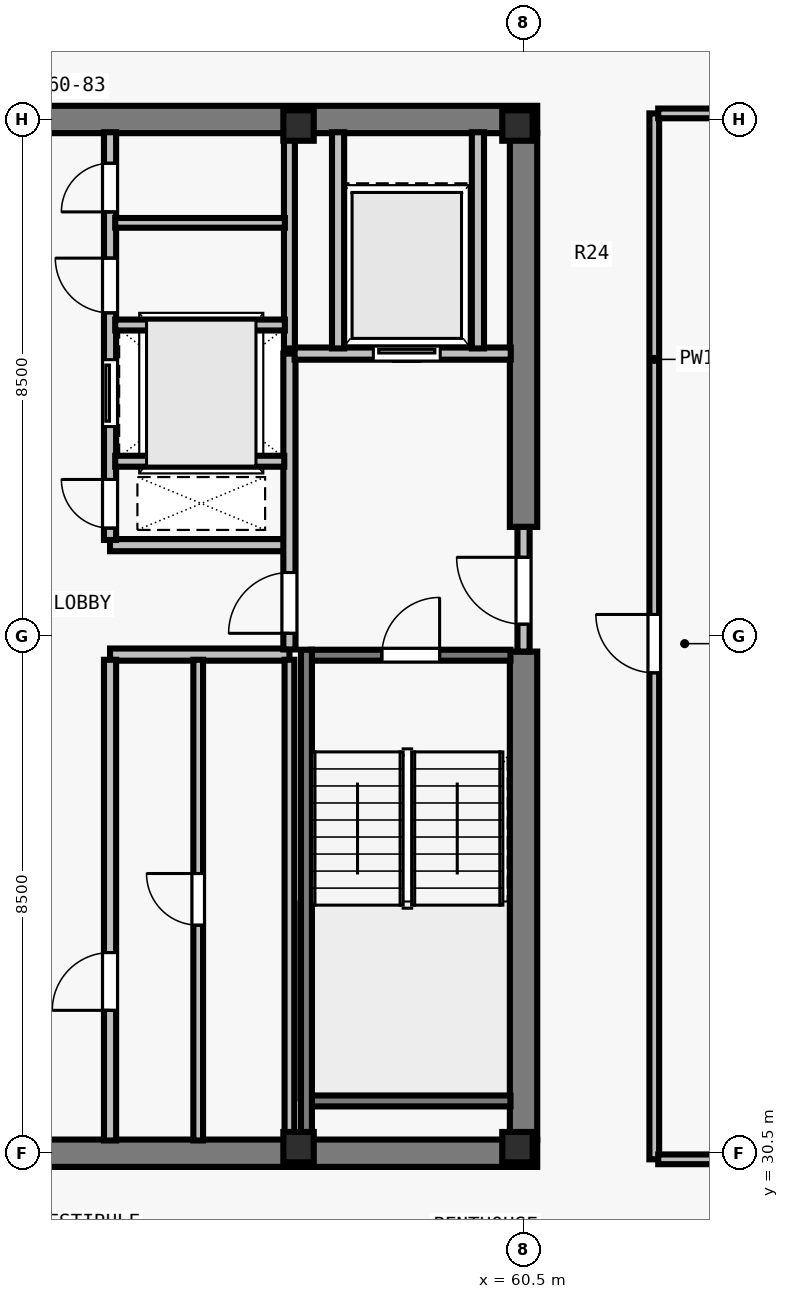
"""IFC4 building model, lengths in metres.
Left out: names, types, materials, properties, quantities, classifications, styles, units other than length and angle.
Written with IfcOpenShell. Run it as: python <this file> out.ifc"""

import sys

from ifc_helpers import new_model, si_unit, direction, frame, frame_2d, origin, origin_2d, place, context, subcontext, project, spatial, rectangle, i_section, extrude, element, fill, save


model = new_model("IFC4")
c1 = context("Model", 3, precision=1e-05, world=origin(), true_north=direction((0.0, 1.0)))
c2 = subcontext(c1, "Body", "Model", "MODEL_VIEW")
j1 = project(units=[si_unit("LENGTHUNIT", "METRE"), si_unit("PLANEANGLEUNIT", "RADIAN")], contexts=[c1])
p1 = place(None, origin())
s1 = spatial("IfcSite", under=j1, at=p1, CompositionType="ELEMENT")
p2 = place(p1, origin())
s2 = spatial("IfcBuilding", under=s1, at=p2, CompositionType="ELEMENT")
p3 = place(p2, frame((0.0, 0.0, 291.0)))
s3 = spatial("IfcBuildingStorey", under=s2, at=p3, CompositionType="ELEMENT", Elevation=291.0)
for number, where, z_axis, x_axis in (
    (1, (56.8, 30.6, 0.0), (0.0, 0.0, 1.0), (1.0, 0.0, 0.0)),
    (2, (60.4, 30.6, 0.0), (0.0, 0.0, 1.0), (1.0, 0.0, 0.0)),
    (3, (56.8, 47.4, 0.0), (0.0, 0.0, 1.0), (1.0, 0.0, 0.0)),
    (4, (60.4, 47.4, 0.0), (0.0, 0.0, 1.0), (1.0, 0.0, 0.0)),
):
    element("IfcColumn", number, at=place(p3, frame(where, z_axis=z_axis, x_axis=x_axis)), inside=s3, PredefinedType="COLUMN", context=c2, shape_type="SweptSolid", body=[
        extrude(i_section(OverallWidth=0.5, OverallDepth=0.5, WebThickness=0.028, FlangeThickness=0.045, at=origin_2d()), origin(), (0.0, 0.0, 1.0), 3.5),
    ])
for number, where, z_axis, x_axis in (
    (5, (43.275, 30.5, 0.0), (0.0, 0.0, 1.0), (1.0, 0.0, 0.0)),
    (6, (43.275, 47.5, 0.0), (0.0, 0.0, 1.0), (1.0, 0.0, 0.0)),
):
    element("IfcWall", number, at=place(p3, frame(where, z_axis=z_axis, x_axis=x_axis)), inside=s3, PredefinedType="SHEAR", context=c2, shape_type="SweptSolid", body=[
        extrude(rectangle(XDim=17.45, YDim=0.45, at=frame_2d((8.725, 0.0))), origin(), (0.0, 0.0, 1.0), 3.29),
    ])
p4 = place(p3, frame((60.5, 30.715, 0.0), z_axis=(0.0, 0.0, 1.0), x_axis=(0.0, 1.0, 0.0)))
e7 = element("IfcWall", 7, at=p4, inside=s3, PredefinedType="SHEAR", context=c2, shape_type="SweptSolid", body=[
    extrude(rectangle(XDim=8.035, YDim=0.45, at=frame_2d((4.018, 0.0))), origin(), (0.0, 0.0, 1.0), 3.29),
])
p5 = place(p3, frame((60.5, 40.8, 0.0), z_axis=(0.0, 0.0, 1.0), x_axis=(0.0, 1.0, 0.0)))
e8 = element("IfcWall", 8, at=p5, inside=s3, PredefinedType="SHEAR", context=c2, shape_type="SweptSolid", body=[
    extrude(rectangle(XDim=6.485, YDim=0.45, at=frame_2d((3.242, 0.0))), origin(), (0.0, 0.0, 1.0), 3.29),
])
for number, where, z_axis, x_axis in (
    (9, (53.7, 38.7, 0.0), (0.0, 0.0, 1.0), (1.0, 0.0, 0.0)),
    (10, (53.7, 40.5, 0.0), (0.0, 0.0, 1.0), (1.0, 0.0, 0.0)),
):
    element("IfcWall", number, at=place(p3, frame(where, z_axis=z_axis, x_axis=x_axis)), inside=s3, PredefinedType="SOLIDWALL", context=c2, shape_type="SweptSolid", body=[
        extrude(rectangle(XDim=2.95, YDim=0.2, at=frame_2d((1.475, 0.0))), origin(), (0.0, 0.0, 1.0), 3.29),
    ])
p6 = place(p3, frame((53.7, 30.71, 0.0), z_axis=(0.0, 0.0, 1.0), x_axis=(0.0, 1.0, 0.0)))
e11 = element("IfcWall", 11, at=p6, inside=s3, PredefinedType="SOLIDWALL", context=c2, shape_type="SweptSolid", body=[
    extrude(rectangle(XDim=7.905, YDim=0.2, at=frame_2d((3.953, 0.0))), origin(), (0.0, 0.0, 1.0), 3.29),
])
p7 = place(p6, frame((2.14, 0.0, 0.0)))
e12 = element("IfcOpeningElement", 12, at=p7, cuts=e11, PredefinedType="OPENING", context=c2, shape_type="SweptSolid", body=[
    extrude(rectangle(XDim=0.95, YDim=2.12, at=frame_2d((0.475, 1.06))), frame((0.0, 0.11, 0.0), z_axis=(0.0, -1.0, 0.0), x_axis=(1.0, 0.0, 0.0)), (0.0, 0.0, 1.0), 0.22),
])
p8 = place(p3, frame((53.7, 40.585, 0.0), z_axis=(0.0, 0.0, 1.0), x_axis=(0.0, 1.0, 0.0)))
e13 = element("IfcWall", 13, at=p8, inside=s3, PredefinedType="SOLIDWALL", context=c2, shape_type="SweptSolid", body=[
    extrude(rectangle(XDim=6.705, YDim=0.2, at=frame_2d((3.353, 0.0))), origin(), (0.0, 0.0, 1.0), 3.29),
])
p9 = place(p8, frame((0.195, 0.0, 0.0)))
e14 = element("IfcOpeningElement", 14, at=p9, cuts=e13, PredefinedType="OPENING", context=c2, shape_type="SweptSolid", body=[
    extrude(rectangle(XDim=0.8, YDim=2.08, at=frame_2d((0.4, 1.04))), frame((0.0, 0.11, 0.0), z_axis=(0.0, -1.0, 0.0), x_axis=(1.0, 0.0, 0.0)), (0.0, 0.0, 1.0), 0.22),
])
p10 = place(p8, frame((1.865, 0.0, 0.0)))
e15 = element("IfcOpeningElement", 15, at=p10, cuts=e13, PredefinedType="OPENING", context=c2, shape_type="SweptSolid", body=[
    extrude(rectangle(XDim=1.1, YDim=2.2, at=frame_2d((0.55, 1.1))), frame((0.0, 0.11, 0.0), z_axis=(0.0, -1.0, 0.0), x_axis=(1.0, 0.0, 0.0)), (0.0, 0.0, 1.0), 0.22),
])
p11 = place(p8, frame((3.735, 0.0, 0.0)))
e16 = element("IfcOpeningElement", 16, at=p11, cuts=e13, PredefinedType="OPENING", context=c2, shape_type="SweptSolid", body=[
    extrude(rectangle(XDim=0.9, YDim=2.12, at=frame_2d((0.45, 1.06))), frame((0.0, 0.11, 0.0), z_axis=(0.0, -1.0, 0.0), x_axis=(1.0, 0.0, 0.0)), (0.0, 0.0, 1.0), 0.22),
])
p12 = place(p8, frame((5.395, 0.0, 0.0)))
e17 = element("IfcOpeningElement", 17, at=p12, cuts=e13, PredefinedType="OPENING", context=c2, shape_type="SweptSolid", body=[
    extrude(rectangle(XDim=0.8, YDim=2.1, at=frame_2d((0.4, 1.05))), frame((0.0, 0.11, 0.0), z_axis=(0.0, -1.0, 0.0), x_axis=(1.0, 0.0, 0.0)), (0.0, 0.0, 1.0), 0.22),
])
p13 = place(p3, frame((60.5, 38.75, 0.0), z_axis=(0.0, 0.0, 1.0), x_axis=(0.0, 1.0, 0.0)))
e18 = element("IfcWall", 18, at=p13, inside=s3, PredefinedType="SOLIDWALL", context=c2, shape_type="SweptSolid", body=[
    extrude(rectangle(XDim=2.05, YDim=0.2, at=frame_2d((1.025, 0.0))), origin(), (0.0, 0.0, 1.0), 3.29),
])
p14 = place(p13, frame((0.45, 0.0, 0.0)))
e19 = element("IfcOpeningElement", 19, at=p14, cuts=e18, PredefinedType="OPENING", context=c2, shape_type="SweptSolid", body=[
    extrude(rectangle(XDim=1.1, YDim=2.15, at=frame_2d((0.55, 1.075))), frame((0.0, 0.11, 0.0), z_axis=(0.0, -1.0, 0.0), x_axis=(1.0, 0.0, 0.0)), (0.0, 0.0, 1.0), 0.22),
])
p15 = place(p3, frame((56.65, 38.785, 0.0), z_axis=(0.0, 0.0, 1.0), x_axis=(0.0, 1.0, 0.0)))
e20 = element("IfcWall", 20, at=p15, inside=s3, PredefinedType="SOLIDWALL", context=c2, shape_type="SweptSolid", body=[
    extrude(rectangle(XDim=4.865, YDim=0.2, at=frame_2d((2.433, 0.0))), origin(), (0.0, 0.0, 1.0), 3.29),
])
p16 = place(p15, frame((0.265, 0.0, 0.0)))
e21 = element("IfcOpeningElement", 21, at=p16, cuts=e20, PredefinedType="OPENING", context=c2, shape_type="SweptSolid", body=[
    extrude(rectangle(XDim=1.0, YDim=2.15, at=frame_2d((0.5, 1.075))), frame((0.0, 0.11, 0.0), z_axis=(0.0, -1.0, 0.0), x_axis=(1.0, 0.0, 0.0)), (0.0, 0.0, 1.0), 0.22),
])
p17 = place(p3, frame((56.735, 43.65, 0.0), z_axis=(0.0, 0.0, 1.0), x_axis=(1.0, 0.0, 0.0)))
e22 = element("IfcWall", 22, at=p17, inside=s3, PredefinedType="SOLIDWALL", context=c2, shape_type="SweptSolid", body=[
    extrude(rectangle(XDim=3.555, YDim=0.2, at=frame_2d((1.777, 0.0))), origin(), (0.0, 0.0, 1.0), 3.29),
])
p18 = place(p17, frame((1.295, 0.0, 0.0)))
e23 = element("IfcOpeningElement", 23, at=p18, cuts=e22, PredefinedType="OPENING", context=c2, shape_type="SweptSolid", body=[
    extrude(rectangle(XDim=1.1, YDim=2.2, at=frame_2d((0.55, 1.1))), frame((0.0, 0.11, 0.0), z_axis=(0.0, -1.0, 0.0), x_axis=(1.0, 0.0, 0.0)), (0.0, 0.0, 1.0), 0.22),
])
for number, where, z_axis, x_axis in (
    (24, (57.45, 43.735, 0.0), (0.0, 0.0, 1.0), (0.0, 1.0, 0.0)),
    (25, (59.75, 43.735, 0.0), (0.0, 0.0, 1.0), (0.0, 1.0, 0.0)),
):
    element("IfcWall", number, at=place(p3, frame(where, z_axis=z_axis, x_axis=x_axis)), inside=s3, PredefinedType="SOLIDWALL", context=c2, shape_type="SweptSolid", body=[
        extrude(rectangle(XDim=3.555, YDim=0.2, at=frame_2d((1.777, 0.0))), origin(), (0.0, 0.0, 1.0), 3.29),
    ])
p19 = place(p3, frame((56.65, 30.71, 0.0), z_axis=(0.0, 0.0, 1.0), x_axis=(0.0, 1.0, 0.0)))
e26 = element("IfcWall", 26, at=p19, inside=s3, PredefinedType="PARTITIONING", context=c2, shape_type="SweptSolid", body=[
    extrude(rectangle(XDim=7.905, YDim=0.16, at=frame_2d((3.953, 0.0))), origin(), (0.0, 0.0, 1.0), 3.29),
])
p20 = place(p3, frame((55.15, 30.71, 0.0), z_axis=(0.0, 0.0, 1.0), x_axis=(0.0, 1.0, 0.0)))
e27 = element("IfcWall", 27, at=p20, inside=s3, PredefinedType="PARTITIONING", context=c2, shape_type="SweptSolid", body=[
    extrude(rectangle(XDim=7.905, YDim=0.16, at=frame_2d((3.953, 0.0))), origin(), (0.0, 0.0, 1.0), 3.29),
])
p21 = place(p20, frame((3.54, 0.0, 0.0)))
e28 = element("IfcOpeningElement", 28, at=p21, cuts=e27, PredefinedType="OPENING", context=c2, shape_type="SweptSolid", body=[
    extrude(rectangle(XDim=0.85, YDim=2.12, at=frame_2d((0.425, 1.06))), frame((0.0, 0.09, 0.0), z_axis=(0.0, -1.0, 0.0), x_axis=(1.0, 0.0, 0.0)), (0.0, 0.0, 1.0), 0.18),
])
p22 = place(p3, frame((56.65, 43.735, 0.0), z_axis=(0.0, 0.0, 1.0), x_axis=(0.0, 1.0, 0.0)))
e29 = element("IfcWall", 29, at=p22, inside=s3, PredefinedType="SOLIDWALL", context=c2, shape_type="SweptSolid", body=[
    extrude(rectangle(XDim=3.555, YDim=0.18, at=frame_2d((1.777, 0.0))), origin(), (0.0, 0.0, 1.0), 3.29),
])
p23 = place(p3, frame((53.785, 41.88, 0.0), z_axis=(0.0, 0.0, 1.0), x_axis=(1.0, 0.0, 0.0)))
e30 = element("IfcWall", 30, at=p23, inside=s3, PredefinedType="SOLIDWALL", context=c2, shape_type="SweptSolid", body=[
    extrude(rectangle(XDim=2.78, YDim=0.18, at=frame_2d((1.39, 0.0))), origin(), (0.0, 0.0, 1.0), 3.29),
])
p24 = place(p3, frame((53.785, 44.12, 0.0), z_axis=(0.0, 0.0, 1.0), x_axis=(1.0, 0.0, 0.0)))
e31 = element("IfcWall", 31, at=p24, inside=s3, PredefinedType="SOLIDWALL", context=c2, shape_type="SweptSolid", body=[
    extrude(rectangle(XDim=2.79, YDim=0.18, at=frame_2d((1.395, 0.0))), origin(), (0.0, 0.0, 1.0), 3.29),
])
p25 = place(p3, frame((53.785, 45.8, 0.0), z_axis=(0.0, 0.0, 1.0), x_axis=(1.0, 0.0, 0.0)))
e32 = element("IfcWall", 32, at=p25, inside=s3, PredefinedType="PARTITIONING", context=c2, shape_type="SweptSolid", body=[
    extrude(rectangle(XDim=2.79, YDim=0.16, at=frame_2d((1.395, 0.0))), origin(), (0.0, 0.0, 1.0), 3.29),
])
p26 = place(p3, frame((62.65, 30.4, 0.0), z_axis=(0.0, 0.0, 1.0), x_axis=(0.0, 1.0, 0.0)))
e33 = element("IfcWall", 33, at=p26, inside=s3, PredefinedType="PARTITIONING", context=c2, shape_type="SweptSolid", body=[
    extrude(rectangle(XDim=17.2, YDim=0.16, at=frame_2d((8.6, 0.0))), origin(), (0.0, 0.0, 1.0), 3.29),
])
p27 = place(p26, frame((8.0, 0.0, 0.0)))
e34 = element("IfcOpeningElement", 34, at=p27, cuts=e33, PredefinedType="OPENING", context=c2, shape_type="SweptSolid", body=[
    extrude(rectangle(XDim=0.96, YDim=2.12, at=frame_2d((0.48, 1.06))), frame((0.0, 0.09, 0.0), z_axis=(0.0, -1.0, 0.0), x_axis=(1.0, 0.0, 0.0)), (0.0, 0.0, 1.0), 0.18),
])
p28 = place(p3, frame((62.715, 30.4, 0.0), z_axis=(0.0, 0.0, 1.0), x_axis=(1.0, 0.0, 0.0)))
e35 = element("IfcWall", 35, at=p28, inside=s3, PredefinedType="PARTITIONING", context=c2, shape_type="SweptSolid", body=[
    extrude(rectangle(XDim=10.015, YDim=0.16, at=frame_2d((5.007, 0.0))), origin(), (0.0, 0.0, 1.0), 3.29),
])
p29 = place(p3, frame((62.715, 47.6, 0.0), z_axis=(0.0, 0.0, 1.0), x_axis=(1.0, 0.0, 0.0)))
e36 = element("IfcWall", 36, at=p29, inside=s3, PredefinedType="PARTITIONING", context=c2, shape_type="SweptSolid", body=[
    extrude(rectangle(XDim=10.0, YDim=0.16, at=frame_2d((5.0, 0.0))), origin(), (0.0, 0.0, 1.0), 3.29),
])
p30 = place(p3, frame((57.005, 38.69, 0.0), z_axis=(0.0, 0.0, 1.0), x_axis=(1.0, 0.0, 0.0)))
e37 = element("IfcWall", 37, at=p30, inside=s3, PredefinedType="SOLIDWALL", context=c2, shape_type="SweptSolid", body=[
    extrude(rectangle(XDim=3.28, YDim=0.18, at=frame_2d((1.64, 0.0))), origin(), (0.0, 0.0, 1.0), 3.29),
])
p31 = place(p30, frame((1.165, 0.0, 0.0)))
e38 = element("IfcOpeningElement", 38, at=p31, cuts=e37, PredefinedType="OPENING", context=c2, shape_type="SweptSolid", body=[
    extrude(rectangle(XDim=0.95, YDim=2.15, at=frame_2d((0.475, 1.075))), frame((0.0, 0.1, 0.0), z_axis=(0.0, -1.0, 0.0), x_axis=(1.0, 0.0, 0.0)), (0.0, 0.0, 1.0), 0.2),
])
p32 = place(p3, frame((57.005, 31.36, 0.0), z_axis=(0.0, 0.0, 1.0), x_axis=(1.0, 0.0, 0.0)))
e39 = element("IfcWall", 39, at=p32, inside=s3, PredefinedType="SOLIDWALL", context=c2, shape_type="SweptSolid", body=[
    extrude(rectangle(XDim=3.28, YDim=0.18, at=frame_2d((1.64, 0.0))), origin(), (0.0, 0.0, 1.0), 3.29),
])
p33 = place(p3, frame((56.93, 38.78, 0.0), z_axis=(0.0, 0.0, 1.0), x_axis=(0.0, -1.0, 0.0)))
e40 = element("IfcWall", 40, at=p33, inside=s3, PredefinedType="SOLIDWALL", context=c2, shape_type="SweptSolid", body=[
    extrude(rectangle(XDim=8.067, YDim=0.18, at=frame_2d((4.034, 0.0))), origin(), (0.0, 0.0, 1.0), 3.29),
])
p34 = place(p14, origin())
e41 = element("IfcDoor", 41, at=p34, inside=s3, OperationType="SINGLE_SWING_RIGHT", PredefinedType="DOOR", context=c2, shape_type="SweptSolid", body=[
    extrude(rectangle(XDim=1.1, YDim=2.15, at=frame_2d((0.55, 1.075))), frame((0.0, 0.025, 0.0), z_axis=(0.0, -1.0, 0.0), x_axis=(1.0, 0.0, 0.0)), (0.0, 0.0, 1.0), 0.05),
])
fill(e19, e41)
p35 = place(p16, origin())
e42 = element("IfcDoor", 42, at=p35, inside=s3, OperationType="SINGLE_SWING_LEFT", PredefinedType="DOOR", context=c2, shape_type="SweptSolid", body=[
    extrude(rectangle(XDim=1.0, YDim=2.15, at=frame_2d((0.5, 1.075))), frame((0.0, 0.025, 0.0), z_axis=(0.0, -1.0, 0.0), x_axis=(1.0, 0.0, 0.0)), (0.0, 0.0, 1.0), 0.05),
])
fill(e21, e42)
p36 = place(p18, origin())
e43 = element("IfcDoor", 43, at=p36, inside=s3, OperationType="SLIDING_TO_LEFT", PredefinedType="DOOR", context=c2, shape_type="SweptSolid", body=[
    extrude(rectangle(XDim=1.1, YDim=2.2, at=frame_2d((0.55, 1.1))), frame((0.0, 0.025, 0.0), z_axis=(0.0, -1.0, 0.0), x_axis=(1.0, 0.0, 0.0)), (0.0, 0.0, 1.0), 0.05),
])
fill(e23, e43)
p37 = place(p7, origin())
e44 = element("IfcDoor", 44, at=p37, inside=s3, OperationType="SINGLE_SWING_LEFT", PredefinedType="DOOR", context=c2, shape_type="SweptSolid", body=[
    extrude(rectangle(XDim=0.95, YDim=2.12, at=frame_2d((0.475, 1.06))), frame((0.0, 0.025, 0.0), z_axis=(0.0, -1.0, 0.0), x_axis=(1.0, 0.0, 0.0)), (0.0, 0.0, 1.0), 0.05),
])
fill(e12, e44)
p38 = place(p21, origin())
e45 = element("IfcDoor", 45, at=p38, inside=s3, OperationType="SINGLE_SWING_RIGHT", PredefinedType="DOOR", context=c2, shape_type="SweptSolid", body=[
    extrude(rectangle(XDim=0.85, YDim=2.12, at=frame_2d((0.425, 1.06))), frame((0.0, 0.025, 0.0), z_axis=(0.0, -1.0, 0.0), x_axis=(1.0, 0.0, 0.0)), (0.0, 0.0, 1.0), 0.05),
])
fill(e28, e45)
p39 = place(p9, origin())
e46 = element("IfcDoor", 46, at=p39, inside=s3, OperationType="SINGLE_SWING_RIGHT", PredefinedType="DOOR", context=c2, shape_type="SweptSolid", body=[
    extrude(rectangle(XDim=0.8, YDim=2.08, at=frame_2d((0.4, 1.04))), frame((0.0, 0.025, 0.0), z_axis=(0.0, -1.0, 0.0), x_axis=(1.0, 0.0, 0.0)), (0.0, 0.0, 1.0), 0.05),
])
fill(e14, e46)
p40 = place(p10, origin())
e47 = element("IfcDoor", 47, at=p40, inside=s3, OperationType="SLIDING_TO_LEFT", PredefinedType="DOOR", context=c2, shape_type="SweptSolid", body=[
    extrude(rectangle(XDim=1.1, YDim=2.2, at=frame_2d((0.55, 1.1))), frame((0.0, 0.025, 0.0), z_axis=(0.0, -1.0, 0.0), x_axis=(1.0, 0.0, 0.0)), (0.0, 0.0, 1.0), 0.05),
])
fill(e15, e47)
p41 = place(p11, origin())
e48 = element("IfcDoor", 48, at=p41, inside=s3, OperationType="SINGLE_SWING_RIGHT", PredefinedType="DOOR", context=c2, shape_type="SweptSolid", body=[
    extrude(rectangle(XDim=0.9, YDim=2.12, at=frame_2d((0.45, 1.06))), frame((0.0, 0.025, 0.0), z_axis=(0.0, -1.0, 0.0), x_axis=(1.0, 0.0, 0.0)), (0.0, 0.0, 1.0), 0.05),
])
fill(e16, e48)
p42 = place(p12, origin())
e49 = element("IfcDoor", 49, at=p42, inside=s3, OperationType="SINGLE_SWING_LEFT", PredefinedType="DOOR", context=c2, shape_type="SweptSolid", body=[
    extrude(rectangle(XDim=0.8, YDim=2.1, at=frame_2d((0.4, 1.05))), frame((0.0, 0.025, 0.0), z_axis=(0.0, -1.0, 0.0), x_axis=(1.0, 0.0, 0.0)), (0.0, 0.0, 1.0), 0.05),
])
fill(e17, e49)
p43 = place(p27, origin())
e50 = element("IfcDoor", 50, at=p43, inside=s3, OperationType="SINGLE_SWING_RIGHT", PredefinedType="DOOR", context=c2, shape_type="SweptSolid", body=[
    extrude(rectangle(XDim=0.96, YDim=2.12, at=frame_2d((0.48, 1.06))), frame((0.0, 0.025, 0.0), z_axis=(0.0, -1.0, 0.0), x_axis=(1.0, 0.0, 0.0)), (0.0, 0.0, 1.0), 0.05),
])
fill(e34, e50)
p44 = place(p31, origin())
e51 = element("IfcDoor", 51, at=p44, inside=s3, OperationType="SINGLE_SWING_RIGHT", PredefinedType="DOOR", context=c2, shape_type="SweptSolid", body=[
    extrude(rectangle(XDim=0.95, YDim=2.15, at=frame_2d((0.475, 1.075))), frame((0.0, 0.025, 0.0), z_axis=(0.0, -1.0, 0.0), x_axis=(1.0, 0.0, 0.0)), (0.0, 0.0, 1.0), 0.05),
])
fill(e38, e51)
save(model, sys.argv[1])
